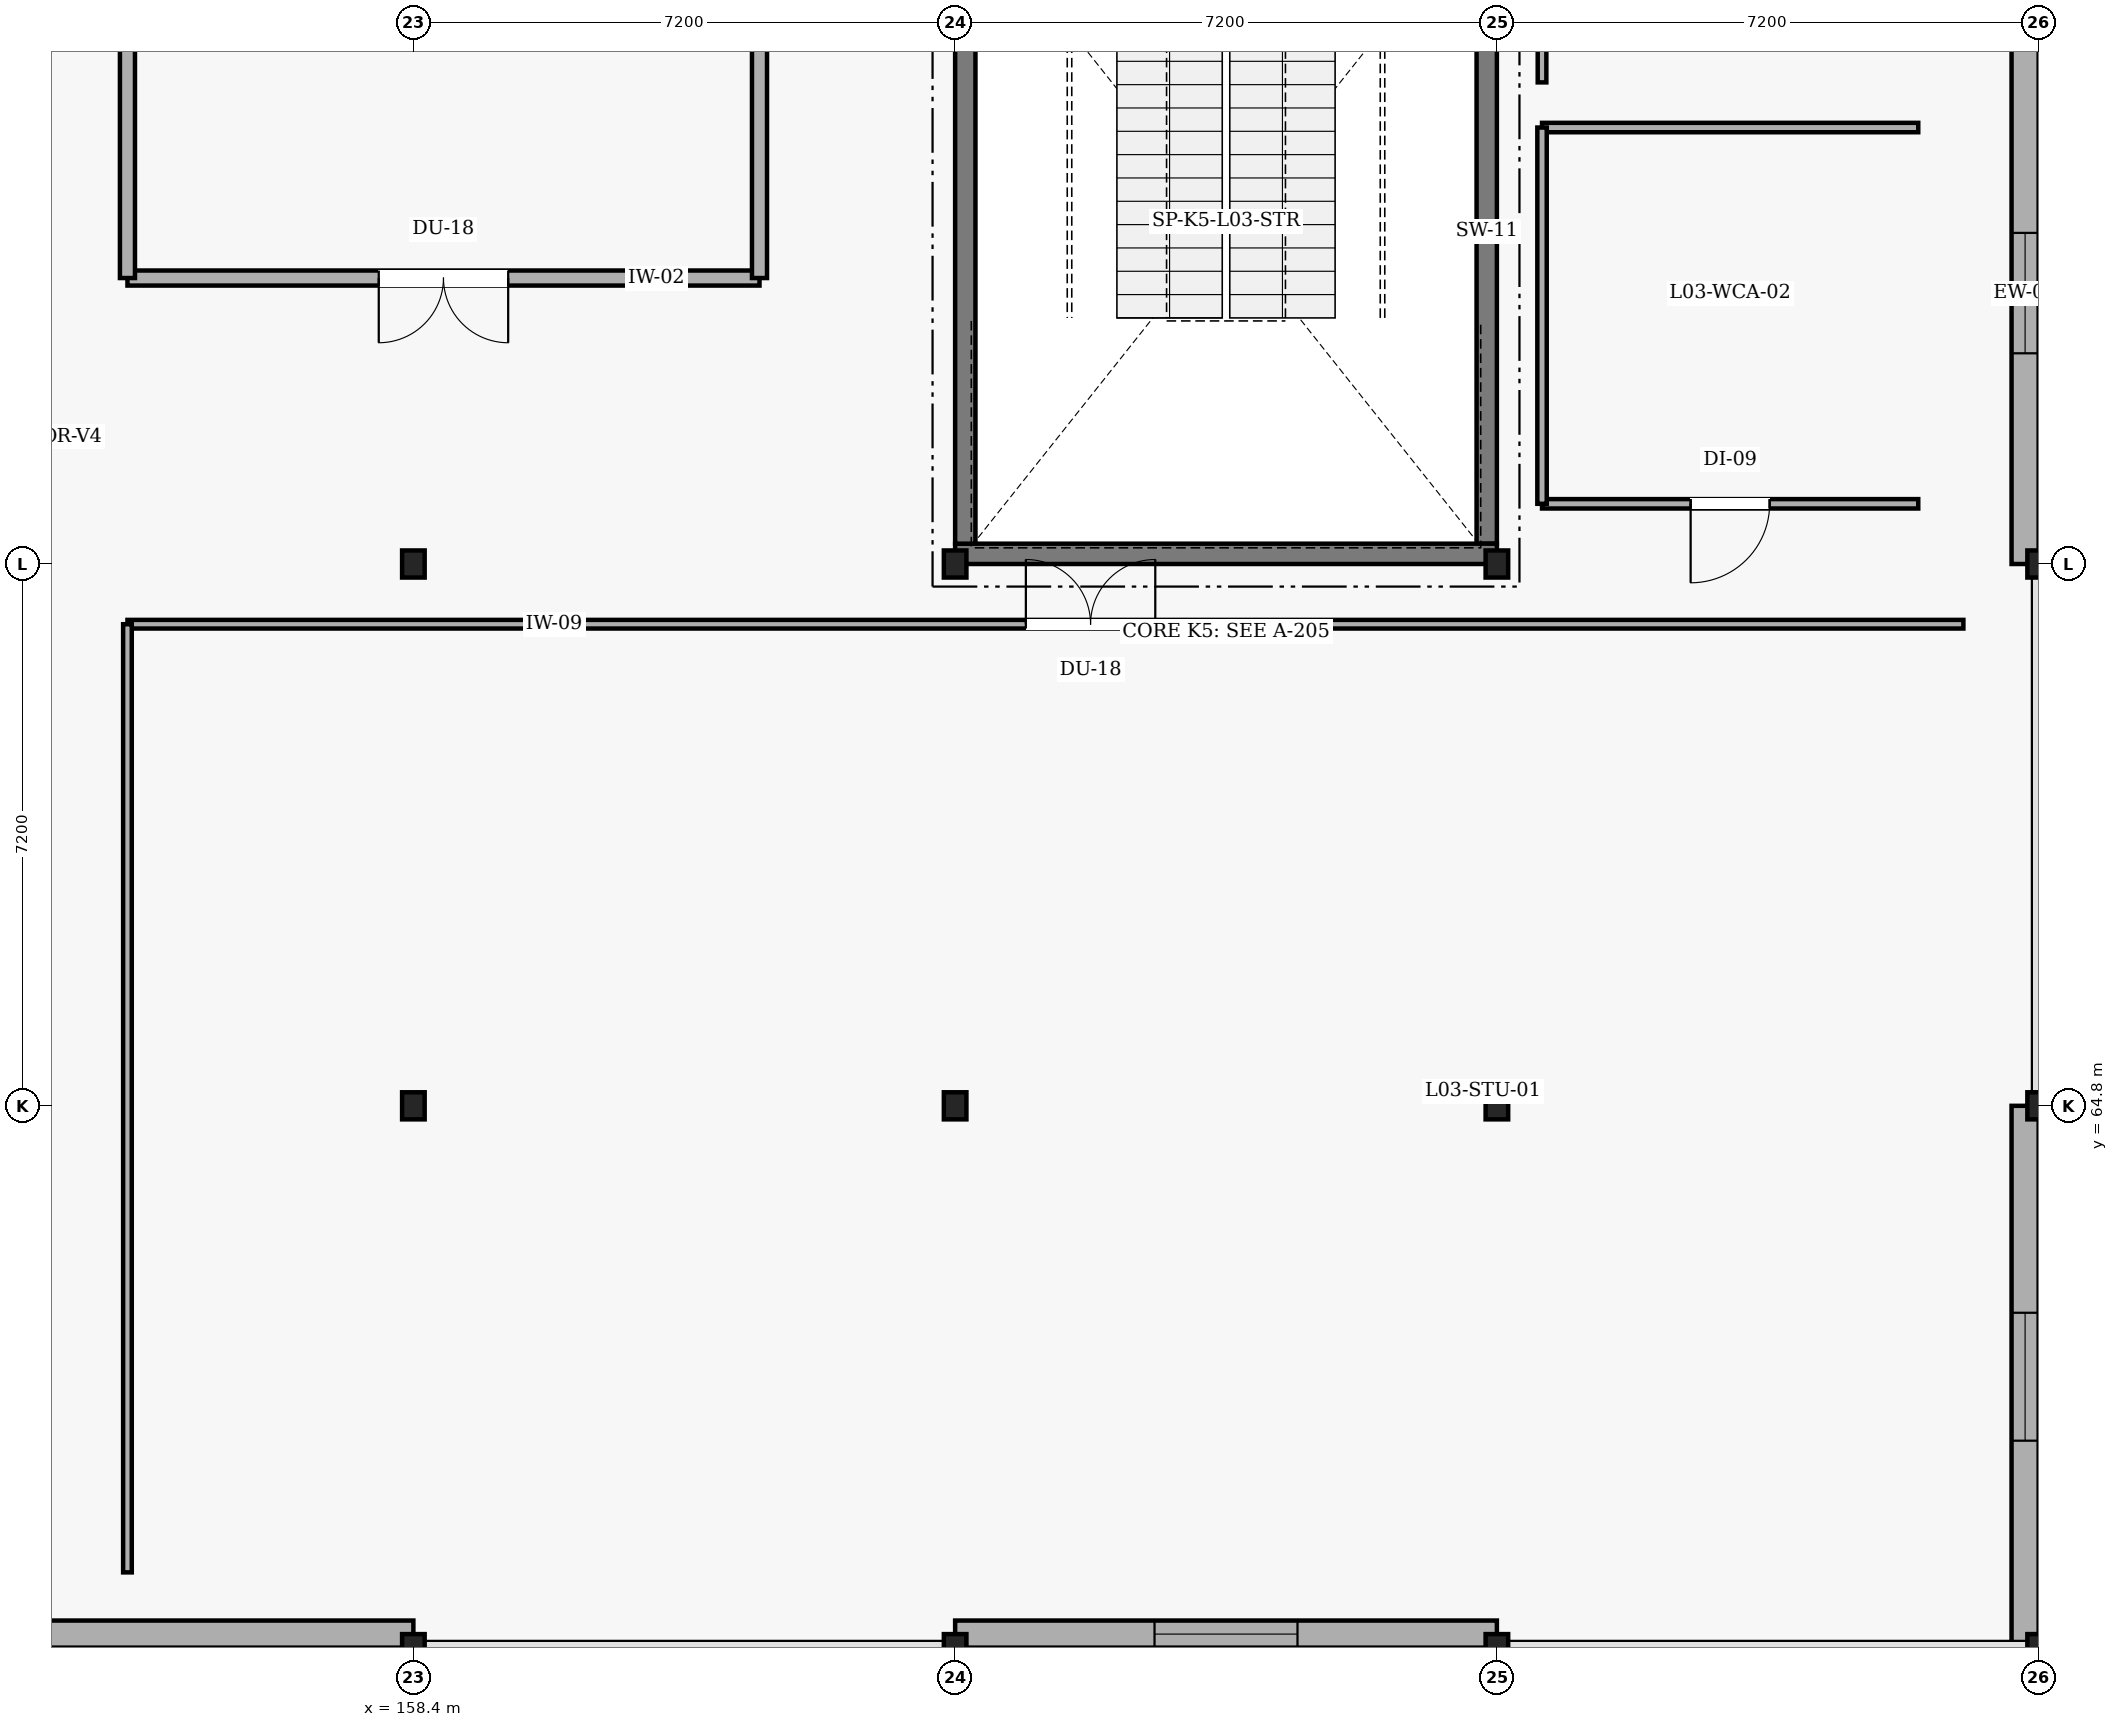
"""IFC4 building model, lengths in metres.
Left out: names, types, materials, properties, quantities, classifications, styles, units other than length and angle.
Written with IfcOpenShell. Run it as: python <this file> out.ifc"""

import sys

from ifc_helpers import new_model, si_unit, direction, frame, frame_2d, origin, origin_2d, place, context, subcontext, project, spatial, rectangle, i_section, extrude, element, fill, save


model = new_model("IFC4")
c1 = context("Model", 3, precision=1e-05, world=origin(), true_north=direction((0.0, 1.0)))
c2 = subcontext(c1, "Body", "Model", "MODEL_VIEW")
j1 = project(units=[si_unit("LENGTHUNIT", "METRE"), si_unit("PLANEANGLEUNIT", "RADIAN")], contexts=[c1])
p1 = place(None, origin())
s1 = spatial("IfcSite", under=j1, at=p1, CompositionType="ELEMENT")
p2 = place(p1, origin())
s2 = spatial("IfcBuilding", under=s1, at=p2, CompositionType="ELEMENT")
p3 = place(p2, frame((0.0, 0.0, 13.8)))
s3 = spatial("IfcBuildingStorey", under=s2, at=p3, CompositionType="ELEMENT", Elevation=13.8)
p4 = place(p3, frame((172.665, 86.13, 0.0), z_axis=(0.0, 0.0, 1.0), x_axis=(0.0, -1.0, 0.0)))
e1 = element("IfcWall", 1, at=p4, inside=s3, PredefinedType="SHEAR", context=c2, shape_type="SweptSolid", body=[
    extrude(rectangle(XDim=13.86, YDim=0.27, at=frame_2d((6.93, 0.0))), origin(), (0.0, 0.0, 1.0), 4.2),
])
p5 = place(p3, frame((172.8, 72.135, 0.0), z_axis=(0.0, 0.0, 1.0), x_axis=(-1.0, 0.0, 0.0)))
e2 = element("IfcWall", 2, at=p5, inside=s3, PredefinedType="SHEAR", context=c2, shape_type="SweptSolid", body=[
    extrude(rectangle(XDim=7.2, YDim=0.27, at=frame_2d((3.6, 0.0))), origin(), (0.0, 0.0, 1.0), 4.2),
])
p6 = place(p3, frame((165.735, 72.27, 0.0), z_axis=(0.0, 0.0, 1.0), x_axis=(0.0, 1.0, 0.0)))
e3 = element("IfcWall", 3, at=p6, inside=s3, PredefinedType="SHEAR", context=c2, shape_type="SweptSolid", body=[
    extrude(rectangle(XDim=13.86, YDim=0.27, at=frame_2d((6.93, 0.0))), origin(), (0.0, 0.0, 1.0), 4.2),
])
p7 = place(p6, frame((9.8, 0.0, 0.0)))
e4 = element("IfcOpeningElement", 4, at=p7, cuts=e3, PredefinedType="OPENING", context=c2, shape_type="SweptSolid", body=[
    extrude(rectangle(XDim=1.25, YDim=2.2, at=frame_2d((0.625, 1.1))), frame((0.0, 0.145, 0.0), z_axis=(0.0, -1.0, 0.0), x_axis=(1.0, 0.0, 0.0)), (0.0, 0.0, 1.0), 0.29),
])
for number, where, z_axis, x_axis in (
    (5, (158.4, 57.6, 0.0), (0.0, 0.0, 1.0), (1.0, 0.0, 0.0)),
    (6, (158.4, 64.8, 0.0), (0.0, 0.0, 1.0), (1.0, 0.0, 0.0)),
    (7, (158.4, 72.0, 0.0), (0.0, 0.0, 1.0), (1.0, 0.0, 0.0)),
):
    element("IfcColumn", number, at=place(p3, frame(where, z_axis=z_axis, x_axis=x_axis)), inside=s3, PredefinedType="COLUMN", context=c2, shape_type="SweptSolid", body=[
        extrude(i_section(OverallWidth=0.3, OverallDepth=0.36, WebThickness=0.012, FlangeThickness=0.022, FilletRadius=0.027, at=origin_2d()), origin(), (0.0, 0.0, 1.0), 3.92),
    ])
p8 = place(p3, frame((165.6, 57.6, 0.0), z_axis=(0.0, 0.0, 1.0), x_axis=(1.0, 0.0, 0.0)))
e8 = element("IfcColumn", 8, at=p8, inside=s3, PredefinedType="COLUMN", context=c2, shape_type="SweptSolid", body=[
    extrude(i_section(OverallWidth=0.3, OverallDepth=0.36, WebThickness=0.012, FlangeThickness=0.022, FilletRadius=0.027, at=origin_2d()), origin(), (0.0, 0.0, 1.0), 3.9),
])
for number, where, z_axis, x_axis in (
    (9, (165.6, 64.8, 0.0), (0.0, 0.0, 1.0), (1.0, 0.0, 0.0)),
    (10, (165.6, 72.0, 0.0), (0.0, 0.0, 1.0), (1.0, 0.0, 0.0)),
):
    element("IfcColumn", number, at=place(p3, frame(where, z_axis=z_axis, x_axis=x_axis)), inside=s3, PredefinedType="COLUMN", context=c2, shape_type="SweptSolid", body=[
        extrude(i_section(OverallWidth=0.3, OverallDepth=0.36, WebThickness=0.012, FlangeThickness=0.022, FilletRadius=0.027, at=origin_2d()), origin(), (0.0, 0.0, 1.0), 3.92),
    ])
p9 = place(p3, frame((172.8, 57.6, 0.0), z_axis=(0.0, 0.0, 1.0), x_axis=(1.0, 0.0, 0.0)))
e11 = element("IfcColumn", 11, at=p9, inside=s3, PredefinedType="COLUMN", context=c2, shape_type="SweptSolid", body=[
    extrude(i_section(OverallWidth=0.3, OverallDepth=0.36, WebThickness=0.012, FlangeThickness=0.022, FilletRadius=0.027, at=origin_2d()), origin(), (0.0, 0.0, 1.0), 3.9),
])
for number, where, z_axis, x_axis in (
    (12, (172.8, 64.8, 0.0), (0.0, 0.0, 1.0), (1.0, 0.0, 0.0)),
    (13, (172.8, 72.0, 0.0), (0.0, 0.0, 1.0), (1.0, 0.0, 0.0)),
):
    element("IfcColumn", number, at=place(p3, frame(where, z_axis=z_axis, x_axis=x_axis)), inside=s3, PredefinedType="COLUMN", context=c2, shape_type="SweptSolid", body=[
        extrude(i_section(OverallWidth=0.3, OverallDepth=0.36, WebThickness=0.012, FlangeThickness=0.022, FilletRadius=0.027, at=origin_2d()), origin(), (0.0, 0.0, 1.0), 3.92),
    ])
for number, where, z_axis, x_axis in (
    (14, (180.0, 57.6, 0.0), (0.0, 0.0, 1.0), (1.0, 0.0, 0.0)),
    (15, (180.0, 64.8, 0.0), (0.0, 0.0, 1.0), (1.0, 0.0, 0.0)),
    (16, (180.0, 72.0, 0.0), (0.0, 0.0, 1.0), (1.0, 0.0, 0.0)),
):
    element("IfcColumn", number, at=place(p3, frame(where, z_axis=z_axis, x_axis=x_axis)), inside=s3, PredefinedType="COLUMN", context=c2, shape_type="SweptSolid", body=[
        extrude(i_section(OverallWidth=0.3, OverallDepth=0.36, WebThickness=0.012, FlangeThickness=0.022, FilletRadius=0.027, at=origin_2d()), origin(), (0.0, 0.0, 1.0), 3.9),
    ])
p10 = place(p3, frame((179.82, 79.2, 0.0), z_axis=(0.0, 0.0, 1.0), x_axis=(0.0, -1.0, 0.0)))
e17 = element("IfcWall", 17, at=p10, inside=s3, PredefinedType="SOLIDWALL", context=c2, shape_type="SweptSolid", body=[
    extrude(rectangle(XDim=7.2, YDim=0.36, at=frame_2d((3.6, 0.0))), origin(), (0.0, 0.0, 1.0), 3.6),
])
p11 = place(p10, frame((2.8, 0.0, 0.9)))
e18 = element("IfcOpeningElement", 18, at=p11, cuts=e17, PredefinedType="OPENING", context=c2, shape_type="SweptSolid", body=[
    extrude(rectangle(XDim=1.6, YDim=1.5, at=frame_2d((0.8, 0.75))), frame((0.0, 0.19, 0.0), z_axis=(0.0, -1.0, 0.0), x_axis=(1.0, 0.0, 0.0)), (0.0, 0.0, 1.0), 0.38),
])
p12 = place(p3, frame((179.82, 64.8, 0.0), z_axis=(0.0, 0.0, 1.0), x_axis=(0.0, -1.0, 0.0)))
e19 = element("IfcWall", 19, at=p12, inside=s3, PredefinedType="SOLIDWALL", context=c2, shape_type="SweptSolid", body=[
    extrude(rectangle(XDim=7.2, YDim=0.36, at=frame_2d((3.6, 0.0))), origin(), (0.0, 0.0, 1.0), 3.6),
])
p13 = place(p12, frame((2.75, 0.0, 0.9)))
e20 = element("IfcOpeningElement", 20, at=p13, cuts=e19, PredefinedType="OPENING", context=c2, shape_type="SweptSolid", body=[
    extrude(rectangle(XDim=1.7, YDim=1.55, at=frame_2d((0.85, 0.775))), frame((0.0, 0.19, 0.0), z_axis=(0.0, -1.0, 0.0), x_axis=(1.0, 0.0, 0.0)), (0.0, 0.0, 1.0), 0.38),
])
p14 = place(p3, frame((172.8, 57.78, 0.0), z_axis=(0.0, 0.0, 1.0), x_axis=(-1.0, 0.0, 0.0)))
e21 = element("IfcWall", 21, at=p14, inside=s3, PredefinedType="SOLIDWALL", context=c2, shape_type="SweptSolid", body=[
    extrude(rectangle(XDim=7.2, YDim=0.36, at=frame_2d((3.6, 0.0))), origin(), (0.0, 0.0, 1.0), 3.6),
])
p15 = place(p14, frame((2.65, 0.0, 0.9)))
e22 = element("IfcOpeningElement", 22, at=p15, cuts=e21, PredefinedType="OPENING", context=c2, shape_type="SweptSolid", body=[
    extrude(rectangle(XDim=1.9, YDim=1.6, at=frame_2d((0.95, 0.8))), frame((0.0, 0.19, 0.0), z_axis=(0.0, -1.0, 0.0), x_axis=(1.0, 0.0, 0.0)), (0.0, 0.0, 1.0), 0.38),
])
p16 = place(p3, frame((158.4, 57.78, 0.0), z_axis=(0.0, 0.0, 1.0), x_axis=(-1.0, 0.0, 0.0)))
e23 = element("IfcWall", 23, at=p16, inside=s3, PredefinedType="SOLIDWALL", context=c2, shape_type="SweptSolid", body=[
    extrude(rectangle(XDim=7.2, YDim=0.36, at=frame_2d((3.6, 0.0))), origin(), (0.0, 0.0, 1.0), 3.62),
])
p17 = place(p3, frame((154.6, 71.2, 0.0), z_axis=(0.0, 0.0, 1.0), x_axis=(1.0, 0.0, 0.0)))
e24 = element("IfcWall", 24, at=p17, inside=s3, PredefinedType="PARTITIONING", context=c2, shape_type="SweptSolid", body=[
    extrude(rectangle(XDim=24.4, YDim=0.115, at=frame_2d((12.2, 0.0))), origin(), (0.0, 0.0, 1.0), 3.52),
])
p18 = place(p17, frame((11.94, 0.0, 0.0)))
e25 = element("IfcOpeningElement", 25, at=p18, cuts=e24, PredefinedType="OPENING", context=c2, shape_type="SweptSolid", body=[
    extrude(rectangle(XDim=1.72, YDim=2.22, at=frame_2d((0.86, 1.11))), frame((0.0, 0.067, 0.0), z_axis=(0.0, -1.0, 0.0), x_axis=(1.0, 0.0, 0.0)), (0.0, 0.0, 1.0), 0.135),
])
p19 = place(p3, frame((154.6, 58.6, 0.0), z_axis=(0.0, 0.0, 1.0), x_axis=(0.0, 1.0, 0.0)))
e26 = element("IfcWall", 26, at=p19, inside=s3, PredefinedType="PARTITIONING", context=c2, shape_type="SweptSolid", body=[
    extrude(rectangle(XDim=12.6, YDim=0.115, at=frame_2d((6.3, 0.0))), origin(), (0.0, 0.0, 1.0), 3.47),
])
p20 = place(p3, frame((163.0, 75.8, 0.0), z_axis=(0.0, 0.0, 1.0), x_axis=(-1.0, 0.0, 0.0)))
e27 = element("IfcWall", 27, at=p20, inside=s3, PredefinedType="PARTITIONING", context=c2, shape_type="SweptSolid", body=[
    extrude(rectangle(XDim=8.4, YDim=0.2, at=frame_2d((4.2, 0.0))), origin(), (0.0, 0.0, 1.0), 3.52),
])
p21 = place(p20, frame((3.34, 0.0, 0.0)))
e28 = element("IfcOpeningElement", 28, at=p21, cuts=e27, PredefinedType="OPENING", context=c2, shape_type="SweptSolid", body=[
    extrude(rectangle(XDim=1.72, YDim=2.22, at=frame_2d((0.86, 1.11))), frame((0.0, 0.11, 0.0), z_axis=(0.0, -1.0, 0.0), x_axis=(1.0, 0.0, 0.0)), (0.0, 0.0, 1.0), 0.22),
])
p22 = place(p3, frame((163.0, 85.6, 0.0), z_axis=(0.0, 0.0, 1.0), x_axis=(0.0, -1.0, 0.0)))
e29 = element("IfcWall", 29, at=p22, inside=s3, PredefinedType="PARTITIONING", context=c2, shape_type="SweptSolid", body=[
    extrude(rectangle(XDim=9.8, YDim=0.2, at=frame_2d((4.9, 0.0))), origin(), (0.0, 0.0, 1.0), 3.47),
])
p23 = place(p3, frame((154.6, 75.8, 0.0), z_axis=(0.0, 0.0, 1.0), x_axis=(0.0, 1.0, 0.0)))
e30 = element("IfcWall", 30, at=p23, inside=s3, PredefinedType="PARTITIONING", context=c2, shape_type="SweptSolid", body=[
    extrude(rectangle(XDim=9.8, YDim=0.2, at=frame_2d((4.9, 0.0))), origin(), (0.0, 0.0, 1.0), 3.53),
])
p24 = place(p3, frame((173.4, 77.8, 0.0), z_axis=(0.0, 0.0, 1.0), x_axis=(1.0, 0.0, 0.0)))
e31 = element("IfcWall", 31, at=p24, inside=s3, PredefinedType="PARTITIONING", context=c2, shape_type="SweptSolid", body=[
    extrude(rectangle(XDim=5.0, YDim=0.125, at=frame_2d((2.5, 0.0))), origin(), (0.0, 0.0, 1.0), 3.85),
])
p25 = place(p3, frame((178.4, 72.8, 0.0), z_axis=(0.0, 0.0, 1.0), x_axis=(-1.0, 0.0, 0.0)))
e32 = element("IfcWall", 32, at=p25, inside=s3, PredefinedType="PARTITIONING", context=c2, shape_type="SweptSolid", body=[
    extrude(rectangle(XDim=5.0, YDim=0.125, at=frame_2d((2.5, 0.0))), origin(), (0.0, 0.0, 1.0), 3.85),
])
p26 = place(p25, frame((1.975, 0.0, 0.0)))
e33 = element("IfcOpeningElement", 33, at=p26, cuts=e32, PredefinedType="OPENING", context=c2, shape_type="SweptSolid", body=[
    extrude(rectangle(XDim=1.05, YDim=2.1, at=frame_2d((0.525, 1.05))), frame((0.0, 0.073, 0.0), z_axis=(0.0, -1.0, 0.0), x_axis=(1.0, 0.0, 0.0)), (0.0, 0.0, 1.0), 0.145),
])
p27 = place(p3, frame((173.4, 72.8, 0.0), z_axis=(0.0, 0.0, 1.0), x_axis=(0.0, 1.0, 0.0)))
e34 = element("IfcWall", 34, at=p27, inside=s3, PredefinedType="PARTITIONING", context=c2, shape_type="SweptSolid", body=[
    extrude(rectangle(XDim=5.0, YDim=0.125, at=frame_2d((2.5, 0.0))), origin(), (0.0, 0.0, 1.0), 3.63),
])
p28 = place(p3, frame((173.4, 78.4, 0.0), z_axis=(0.0, 0.0, 1.0), x_axis=(0.0, 1.0, 0.0)))
e35 = element("IfcWall", 35, at=p28, inside=s3, PredefinedType="PARTITIONING", context=c2, shape_type="SweptSolid", body=[
    extrude(rectangle(XDim=7.4, YDim=0.115, at=frame_2d((3.7, 0.0))), origin(), (0.0, 0.0, 1.0), 3.45),
])
p29 = place(p28, frame((2.78, 0.0, 0.0)))
e36 = element("IfcOpeningElement", 36, at=p29, cuts=e35, PredefinedType="OPENING", context=c2, shape_type="SweptSolid", body=[
    extrude(rectangle(XDim=1.84, YDim=2.24, at=frame_2d((0.92, 1.12))), frame((0.0, 0.067, 0.0), z_axis=(0.0, -1.0, 0.0), x_axis=(1.0, 0.0, 0.0)), (0.0, 0.0, 1.0), 0.135),
])
p30 = place(p11, origin())
e37 = element("IfcWindow", 37, at=p30, inside=s3, PartitioningType="SINGLE_PANEL", PredefinedType="WINDOW", context=c2, shape_type="SweptSolid", body=[
    extrude(rectangle(XDim=1.6, YDim=1.5, at=frame_2d((0.8, 0.75))), frame((0.0, 0.03, 0.0), z_axis=(0.0, -1.0, 0.0), x_axis=(1.0, 0.0, 0.0)), (0.0, 0.0, 1.0), 0.06),
])
fill(e18, e37)
p31 = place(p13, origin())
e38 = element("IfcWindow", 38, at=p31, inside=s3, PartitioningType="SINGLE_PANEL", PredefinedType="WINDOW", context=c2, shape_type="SweptSolid", body=[
    extrude(rectangle(XDim=1.7, YDim=1.55, at=frame_2d((0.85, 0.775))), frame((0.0, 0.03, 0.0), z_axis=(0.0, -1.0, 0.0), x_axis=(1.0, 0.0, 0.0)), (0.0, 0.0, 1.0), 0.06),
])
fill(e20, e38)
p32 = place(p15, origin())
e39 = element("IfcWindow", 39, at=p32, inside=s3, PartitioningType="SINGLE_PANEL", PredefinedType="WINDOW", context=c2, shape_type="SweptSolid", body=[
    extrude(rectangle(XDim=1.9, YDim=1.6, at=frame_2d((0.95, 0.8))), frame((0.0, 0.03, 0.0), z_axis=(0.0, -1.0, 0.0), x_axis=(1.0, 0.0, 0.0)), (0.0, 0.0, 1.0), 0.06),
])
fill(e22, e39)
p33 = place(p18, origin())
e40 = element("IfcDoor", 40, at=p33, inside=s3, OperationType="DOUBLE_DOOR_SINGLE_SWING", PredefinedType="DOOR", context=c2, shape_type="SweptSolid", body=[
    extrude(rectangle(XDim=1.72, YDim=2.22, at=frame_2d((0.86, 1.11))), frame((0.0, 0.025, 0.0), z_axis=(0.0, -1.0, 0.0), x_axis=(1.0, 0.0, 0.0)), (0.0, 0.0, 1.0), 0.05),
])
fill(e25, e40)
p34 = place(p21, origin())
e41 = element("IfcDoor", 41, at=p34, inside=s3, OperationType="DOUBLE_DOOR_SINGLE_SWING", PredefinedType="DOOR", context=c2, shape_type="SweptSolid", body=[
    extrude(rectangle(XDim=1.72, YDim=2.22, at=frame_2d((0.86, 1.11))), frame((0.0, 0.025, 0.0), z_axis=(0.0, -1.0, 0.0), x_axis=(1.0, 0.0, 0.0)), (0.0, 0.0, 1.0), 0.05),
])
fill(e28, e41)
p35 = place(p26, origin())
e42 = element("IfcDoor", 42, at=p35, inside=s3, OperationType="SINGLE_SWING_RIGHT", PredefinedType="DOOR", context=c2, shape_type="SweptSolid", body=[
    extrude(rectangle(XDim=1.05, YDim=2.1, at=frame_2d((0.525, 1.05))), frame((0.0, 0.025, 0.0), z_axis=(0.0, -1.0, 0.0), x_axis=(1.0, 0.0, 0.0)), (0.0, 0.0, 1.0), 0.05),
])
fill(e33, e42)
save(model, sys.argv[1])
